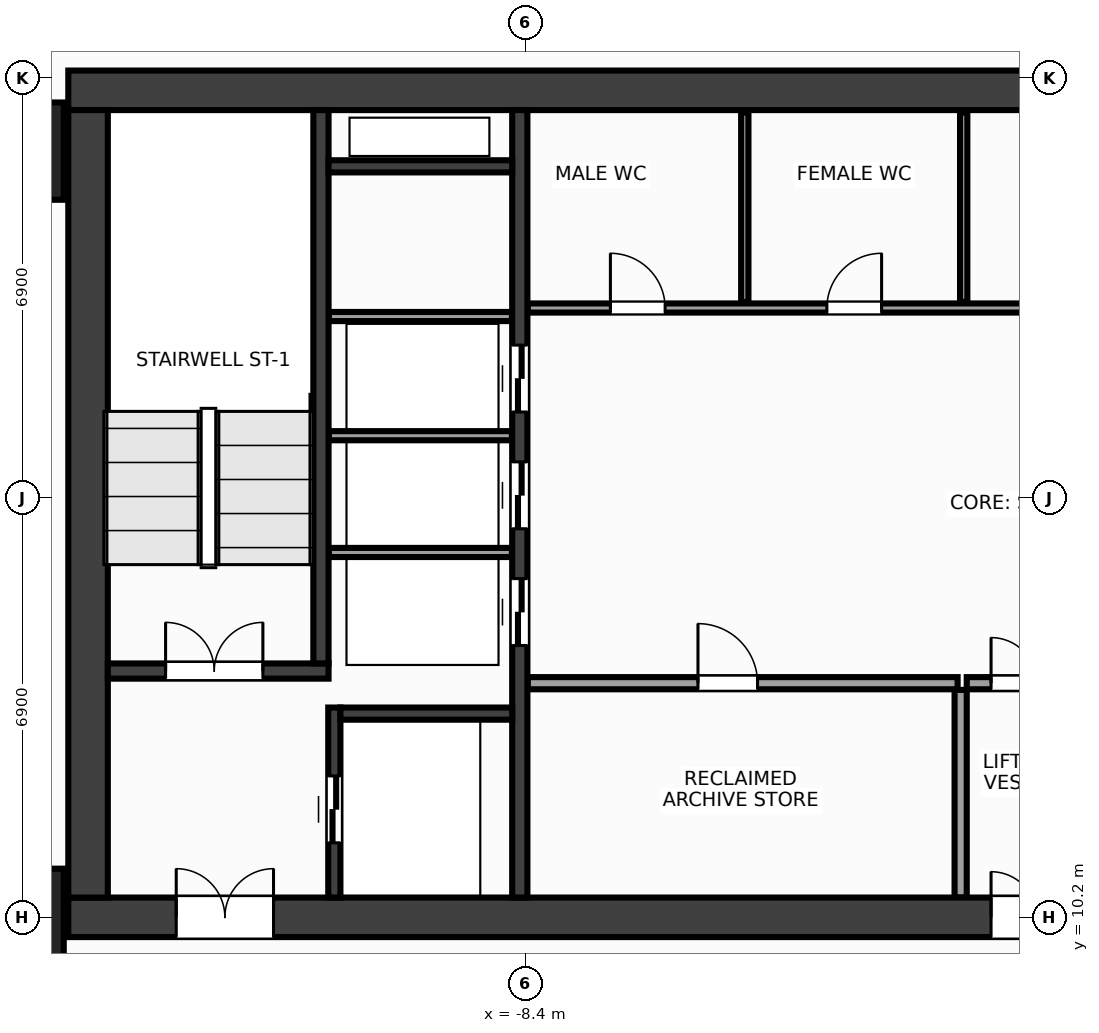
"""IFC4 building model, lengths in metres.
Left out: names, types, materials, properties, quantities, classifications, styles, units other than length and angle.
Written with IfcOpenShell. Run it as: python <this file> out.ifc"""

import sys

from ifc_helpers import new_model, si_unit, direction, frame, frame_2d, origin, origin_2d, place, context, subcontext, project, spatial, rectangle, extrude, source, transform, mapped, element, fill, save


model = new_model("IFC4")
c1 = context("Model", 3, precision=1e-05, world=origin(), true_north=direction((0.0, 1.0)))
c2 = subcontext(c1, "Body", "Model", "MODEL_VIEW")
j1 = project(units=[si_unit("LENGTHUNIT", "METRE"), si_unit("PLANEANGLEUNIT", "RADIAN")], contexts=[c1])
p1 = place(None, origin())
s1 = spatial("IfcSite", under=j1, at=p1, CompositionType="ELEMENT")
p2 = place(p1, origin())
s2 = spatial("IfcBuilding", under=s1, at=p2, CompositionType="ELEMENT")
p3 = place(p2, frame((0.0, 0.0, 146.0)))
s3 = spatial("IfcBuildingStorey", under=s2, at=p3, CompositionType="ELEMENT", Elevation=146.0)
m1 = source(origin(), c2, "Body", "SweptSolid", [
    extrude(rectangle(XDim=31.85, YDim=0.65, at=frame_2d((15.925, 0.0))), origin(), (0.0, 0.0, 1.0), 3.6),
])
p4 = place(p3, frame((-15.925, 23.8, 0.0), z_axis=(0.0, 0.0, 1.0), x_axis=(1.0, 0.0, 0.0)))
e1 = element("IfcWall", 1, at=p4, inside=s3, PredefinedType="SHEAR", context=c2, shape_type="MappedRepresentation", body=[
    mapped(m1, transform((0.0, 0.0, 0.0), x_axis=(1.0, 0.0, 0.0), y_axis=(0.0, 1.0, 0.0), z_axis=(0.0, 0.0, 1.0), scale=1.0)),
])
p5 = place(p3, frame((-15.925, 10.2, 0.0), z_axis=(0.0, 0.0, 1.0), x_axis=(1.0, 0.0, 0.0)))
e2 = element("IfcWall", 2, at=p5, inside=s3, PredefinedType="SHEAR", context=c2, shape_type="MappedRepresentation", body=[
    mapped(m1, transform((0.0, 0.0, 0.0), x_axis=(1.0, 0.0, 0.0), y_axis=(0.0, 1.0, 0.0), z_axis=(0.0, 0.0, 1.0), scale=1.0)),
])
p6 = place(p5, frame((1.775, 0.0, 0.0)))
e3 = element("IfcOpeningElement", 3, at=p6, cuts=e2, PredefinedType="OPENING", context=c2, shape_type="SweptSolid", body=[
    extrude(rectangle(XDim=1.6, YDim=2.15, at=frame_2d((0.8, 1.075))), frame((0.0, 0.337, 0.0), z_axis=(0.0, -1.0, 0.0), x_axis=(1.0, 0.0, 0.0)), (0.0, 0.0, 1.0), 0.674),
])
p7 = place(p5, frame((28.475, 0.0, 0.0)))
e4 = element("IfcOpeningElement", 4, at=p7, cuts=e2, PredefinedType="OPENING", context=c2, shape_type="SweptSolid", body=[
    extrude(rectangle(XDim=1.6, YDim=2.15, at=frame_2d((0.8, 1.075))), frame((0.0, 0.337, 0.0), z_axis=(0.0, -1.0, 0.0), x_axis=(1.0, 0.0, 0.0)), (0.0, 0.0, 1.0), 0.674),
])
p8 = place(p5, frame((15.175, 0.0, 0.0)))
e5 = element("IfcOpeningElement", 5, at=p8, cuts=e2, PredefinedType="OPENING", context=c2, shape_type="SweptSolid", body=[
    extrude(rectangle(XDim=1.5, YDim=2.2, at=frame_2d((0.75, 1.1))), frame((0.0, 0.337, 0.0), z_axis=(0.0, -1.0, 0.0), x_axis=(1.0, 0.0, 0.0)), (0.0, 0.0, 1.0), 0.674),
])
m2 = source(origin(), c2, "Body", "SweptSolid", [
    extrude(rectangle(XDim=12.95, YDim=0.65, at=frame_2d((6.475, 0.0))), origin(), (0.0, 0.0, 1.0), 3.6),
])
p9 = place(p3, frame((-15.6, 10.525, 0.0), z_axis=(0.0, 0.0, 1.0), x_axis=(0.0, 1.0, 0.0)))
e6 = element("IfcWall", 6, at=p9, inside=s3, PredefinedType="SHEAR", context=c2, shape_type="MappedRepresentation", body=[
    mapped(m2, transform((0.0, 0.0, 0.0), x_axis=(1.0, 0.0, 0.0), y_axis=(0.0, 1.0, 0.0), z_axis=(0.0, 0.0, 1.0), scale=1.0)),
])
m3 = source(origin(), c2, "Body", "SweptSolid", [
    extrude(rectangle(XDim=12.95, YDim=0.25, at=frame_2d((6.475, 0.0))), origin(), (0.0, 0.0, 1.0), 3.6),
])
p10 = place(p3, frame((-8.5, 10.525, 0.0), z_axis=(0.0, 0.0, 1.0), x_axis=(0.0, 1.0, 0.0)))
e7 = element("IfcWall", 7, at=p10, inside=s3, PredefinedType="SHEAR", context=c2, shape_type="MappedRepresentation", body=[
    mapped(m3, transform((0.0, 0.0, 0.0), x_axis=(1.0, 0.0, 0.0), y_axis=(0.0, 1.0, 0.0), z_axis=(0.0, 0.0, 1.0), scale=1.0)),
])
p11 = place(p10, frame((4.145, 0.0, 0.0)))
e8 = element("IfcOpeningElement", 8, at=p11, cuts=e7, PredefinedType="OPENING", context=c2, shape_type="SweptSolid", body=[
    extrude(rectangle(XDim=1.1, YDim=2.15, at=frame_2d((0.55, 1.075))), frame((0.0, 0.137, 0.0), z_axis=(0.0, -1.0, 0.0), x_axis=(1.0, 0.0, 0.0)), (0.0, 0.0, 1.0), 0.274),
])
p12 = place(p10, frame((6.065, 0.0, 0.0)))
e9 = element("IfcOpeningElement", 9, at=p12, cuts=e7, PredefinedType="OPENING", context=c2, shape_type="SweptSolid", body=[
    extrude(rectangle(XDim=1.1, YDim=2.15, at=frame_2d((0.55, 1.075))), frame((0.0, 0.137, 0.0), z_axis=(0.0, -1.0, 0.0), x_axis=(1.0, 0.0, 0.0)), (0.0, 0.0, 1.0), 0.274),
])
p13 = place(p10, frame((7.985, 0.0, 0.0)))
e10 = element("IfcOpeningElement", 10, at=p13, cuts=e7, PredefinedType="OPENING", context=c2, shape_type="SweptSolid", body=[
    extrude(rectangle(XDim=1.1, YDim=2.15, at=frame_2d((0.55, 1.075))), frame((0.0, 0.137, 0.0), z_axis=(0.0, -1.0, 0.0), x_axis=(1.0, 0.0, 0.0)), (0.0, 0.0, 1.0), 0.274),
])
m4 = source(origin(), c2, "Body", "SweptSolid", [
    extrude(rectangle(XDim=3.63, YDim=0.25, at=frame_2d((1.815, 0.0))), origin(), (0.0, 0.0, 1.0), 3.6),
])
p14 = place(p3, frame((-15.275, 14.25, 0.0), z_axis=(0.0, 0.0, 1.0), x_axis=(1.0, 0.0, 0.0)))
e11 = element("IfcWall", 11, at=p14, inside=s3, PredefinedType="SHEAR", context=c2, shape_type="MappedRepresentation", body=[
    mapped(m4, transform((0.0, 0.0, 0.0), x_axis=(1.0, 0.0, 0.0), y_axis=(0.0, 1.0, 0.0), z_axis=(0.0, 0.0, 1.0), scale=1.0)),
])
p15 = place(p14, frame((0.95, 0.0, 0.0)))
e12 = element("IfcOpeningElement", 12, at=p15, cuts=e11, PredefinedType="OPENING", context=c2, shape_type="SweptSolid", body=[
    extrude(rectangle(XDim=1.6, YDim=2.15, at=frame_2d((0.8, 1.075))), frame((0.0, 0.137, 0.0), z_axis=(0.0, -1.0, 0.0), x_axis=(1.0, 0.0, 0.0)), (0.0, 0.0, 1.0), 0.274),
])
m5 = source(origin(), c2, "Body", "SweptSolid", [
    extrude(rectangle(XDim=9.1, YDim=0.25, at=frame_2d((4.55, 0.0))), origin(), (0.0, 0.0, 1.0), 3.6),
])
p16 = place(p3, frame((-11.77, 14.375, 0.0), z_axis=(0.0, 0.0, 1.0), x_axis=(0.0, 1.0, 0.0)))
e13 = element("IfcWall", 13, at=p16, inside=s3, PredefinedType="SHEAR", context=c2, shape_type="MappedRepresentation", body=[
    mapped(m5, transform((0.0, 0.0, 0.0), x_axis=(1.0, 0.0, 0.0), y_axis=(0.0, 1.0, 0.0), z_axis=(0.0, 0.0, 1.0), scale=1.0)),
])
m6 = source(origin(), c2, "Body", "SweptSolid", [
    extrude(rectangle(XDim=3.125, YDim=0.2, at=frame_2d((1.562, 0.0))), origin(), (0.0, 0.0, 1.0), 3.6),
])
p17 = place(p3, frame((-11.55, 10.525, 0.0), z_axis=(0.0, 0.0, 1.0), x_axis=(0.0, 1.0, 0.0)))
e14 = element("IfcWall", 14, at=p17, inside=s3, PredefinedType="SHEAR", context=c2, shape_type="MappedRepresentation", body=[
    mapped(m6, transform((0.0, 0.0, 0.0), x_axis=(1.0, 0.0, 0.0), y_axis=(0.0, 1.0, 0.0), z_axis=(0.0, 0.0, 1.0), scale=1.0)),
])
p18 = place(p17, frame((0.9, 0.0, 0.0)))
e15 = element("IfcOpeningElement", 15, at=p18, cuts=e14, PredefinedType="OPENING", context=c2, shape_type="SweptSolid", body=[
    extrude(rectangle(XDim=1.1, YDim=2.15, at=frame_2d((0.55, 1.075))), frame((0.0, 0.112, 0.0), z_axis=(0.0, -1.0, 0.0), x_axis=(1.0, 0.0, 0.0)), (0.0, 0.0, 1.0), 0.224),
])
m7 = source(origin(), c2, "Body", "SweptSolid", [
    extrude(rectangle(XDim=2.825, YDim=0.2, at=frame_2d((1.413, 0.0))), origin(), (0.0, 0.0, 1.0), 3.6),
])
p19 = place(p3, frame((-11.45, 13.55, 0.0), z_axis=(0.0, 0.0, 1.0), x_axis=(1.0, 0.0, 0.0)))
e16 = element("IfcWall", 16, at=p19, inside=s3, PredefinedType="SHEAR", context=c2, shape_type="MappedRepresentation", body=[
    mapped(m7, transform((0.0, 0.0, 0.0), x_axis=(1.0, 0.0, 0.0), y_axis=(0.0, 1.0, 0.0), z_axis=(0.0, 0.0, 1.0), scale=1.0)),
])
m8 = source(origin(), c2, "Body", "SweptSolid", [
    extrude(rectangle(XDim=3.02, YDim=0.2, at=frame_2d((1.51, 0.0))), origin(), (0.0, 0.0, 1.0), 3.6),
])
p20 = place(p3, frame((-11.645, 22.55, 0.0), z_axis=(0.0, 0.0, 1.0), x_axis=(1.0, 0.0, 0.0)))
e17 = element("IfcWall", 17, at=p20, inside=s3, PredefinedType="SHEAR", context=c2, shape_type="MappedRepresentation", body=[
    mapped(m8, transform((0.0, 0.0, 0.0), x_axis=(1.0, 0.0, 0.0), y_axis=(0.0, 1.0, 0.0), z_axis=(0.0, 0.0, 1.0), scale=1.0)),
])
m9 = source(origin(), c2, "Body", "SweptSolid", [
    extrude(rectangle(XDim=1.6, YDim=1.6, at=origin_2d()), origin(), (0.0, 0.0, 1.0), 3.6),
])
for number, where, z_axis, x_axis in (
    (18, (-16.8, 10.2, 0.0), (0.0, 0.0, 1.0), (1.0, 0.0, 0.0)),
    (19, (-16.8, 22.8, 0.0), (0.0, 0.0, 1.0), (1.0, 0.0, 0.0)),
):
    element("IfcColumn", number, at=place(p3, frame(where, z_axis=z_axis, x_axis=x_axis)), inside=s3, PredefinedType="COLUMN", context=c2, shape_type="MappedRepresentation", body=[
        mapped(m9, transform((0.0, 0.0, 0.0), x_axis=(1.0, 0.0, 0.0), y_axis=(0.0, 1.0, 0.0), z_axis=(0.0, 0.0, 1.0), scale=1.0)),
    ])
m10 = source(origin(), c2, "Body", "SweptSolid", [
    extrude(rectangle(XDim=3.01, YDim=0.15, at=frame_2d((1.505, 0.0))), origin(), (0.0, 0.0, 1.0), 3.38),
])
for number, where, z_axis, x_axis in (
    (20, (-11.64, 16.2, 0.0), (0.0, 0.0, 1.0), (1.0, 0.0, 0.0)),
    (21, (-11.64, 18.12, 0.0), (0.0, 0.0, 1.0), (1.0, 0.0, 0.0)),
    (22, (-11.64, 20.08, 0.0), (0.0, 0.0, 1.0), (1.0, 0.0, 0.0)),
):
    element("IfcWall", number, at=place(p3, frame(where, z_axis=z_axis, x_axis=x_axis)), inside=s3, PredefinedType="PARTITIONING", context=c2, shape_type="MappedRepresentation", body=[
        mapped(m10, transform((0.0, 0.0, 0.0), x_axis=(1.0, 0.0, 0.0), y_axis=(0.0, 1.0, 0.0), z_axis=(0.0, 0.0, 1.0), scale=1.0)),
    ])
m11 = source(origin(), c2, "Body", "SweptSolid", [
    extrude(rectangle(XDim=7.07, YDim=0.2, at=frame_2d((3.535, 0.0))), origin(), (0.0, 0.0, 1.0), 3.38),
])
p21 = place(p3, frame((-8.37, 14.05, 0.0), z_axis=(0.0, 0.0, 1.0), x_axis=(1.0, 0.0, 0.0)))
e23 = element("IfcWall", 23, at=p21, inside=s3, PredefinedType="PARTITIONING", context=c2, shape_type="MappedRepresentation", body=[
    mapped(m11, transform((0.0, 0.0, 0.0), x_axis=(1.0, 0.0, 0.0), y_axis=(0.0, 1.0, 0.0), z_axis=(0.0, 0.0, 1.0), scale=1.0)),
])
p22 = place(p21, frame((2.8, 0.0, 0.0)))
e24 = element("IfcOpeningElement", 24, at=p22, cuts=e23, PredefinedType="OPENING", context=c2, shape_type="SweptSolid", body=[
    extrude(rectangle(XDim=0.98, YDim=2.15, at=frame_2d((0.49, 1.075))), frame((0.0, 0.112, 0.0), z_axis=(0.0, -1.0, 0.0), x_axis=(1.0, 0.0, 0.0)), (0.0, 0.0, 1.0), 0.224),
])
m12 = source(origin(), c2, "Body", "SweptSolid", [
    extrude(rectangle(XDim=3.415, YDim=0.2, at=frame_2d((1.708, 0.0))), origin(), (0.0, 0.0, 1.0), 3.38),
])
p23 = place(p3, frame((-1.25, 10.525, 0.0), z_axis=(0.0, 0.0, 1.0), x_axis=(0.0, 1.0, 0.0)))
e25 = element("IfcWall", 25, at=p23, inside=s3, PredefinedType="PARTITIONING", context=c2, shape_type="MappedRepresentation", body=[
    mapped(m12, transform((0.0, 0.0, 0.0), x_axis=(1.0, 0.0, 0.0), y_axis=(0.0, 1.0, 0.0), z_axis=(0.0, 0.0, 1.0), scale=1.0)),
])
m13 = source(origin(), c2, "Body", "SweptSolid", [
    extrude(rectangle(XDim=2.3, YDim=0.2, at=frame_2d((1.15, 0.0))), origin(), (0.0, 0.0, 1.0), 3.38),
])
p24 = place(p3, frame((-1.15, 14.05, 0.0), z_axis=(0.0, 0.0, 1.0), x_axis=(1.0, 0.0, 0.0)))
e26 = element("IfcWall", 26, at=p24, inside=s3, PredefinedType="PARTITIONING", context=c2, shape_type="MappedRepresentation", body=[
    mapped(m13, transform((0.0, 0.0, 0.0), x_axis=(1.0, 0.0, 0.0), y_axis=(0.0, 1.0, 0.0), z_axis=(0.0, 0.0, 1.0), scale=1.0)),
])
p25 = place(p24, frame((0.4, 0.0, 0.0)))
e27 = element("IfcOpeningElement", 27, at=p25, cuts=e26, PredefinedType="OPENING", context=c2, shape_type="SweptSolid", body=[
    extrude(rectangle(XDim=1.5, YDim=2.2, at=frame_2d((0.75, 1.1))), frame((0.0, 0.112, 0.0), z_axis=(0.0, -1.0, 0.0), x_axis=(1.0, 0.0, 0.0)), (0.0, 0.0, 1.0), 0.224),
])
m14 = source(origin(), c2, "Body", "SweptSolid", [
    extrude(rectangle(XDim=14.59, YDim=0.15, at=frame_2d((7.295, 0.0))), origin(), (0.0, 0.0, 1.0), 3.38),
])
p26 = place(p3, frame((-8.37, 20.22, 0.0), z_axis=(0.0, 0.0, 1.0), x_axis=(1.0, 0.0, 0.0)))
e28 = element("IfcWall", 28, at=p26, inside=s3, PredefinedType="PARTITIONING", context=c2, shape_type="MappedRepresentation", body=[
    mapped(m14, transform((0.0, 0.0, 0.0), x_axis=(1.0, 0.0, 0.0), y_axis=(0.0, 1.0, 0.0), z_axis=(0.0, 0.0, 1.0), scale=1.0)),
])
p27 = place(p26, frame((1.36, 0.0, 0.0)))
e29 = element("IfcOpeningElement", 29, at=p27, cuts=e28, PredefinedType="OPENING", context=c2, shape_type="SweptSolid", body=[
    extrude(rectangle(XDim=0.9, YDim=2.15, at=frame_2d((0.45, 1.075))), frame((0.0, 0.087, 0.0), z_axis=(0.0, -1.0, 0.0), x_axis=(1.0, 0.0, 0.0)), (0.0, 0.0, 1.0), 0.174),
])
p28 = place(p26, frame((4.92, 0.0, 0.0)))
e30 = element("IfcOpeningElement", 30, at=p28, cuts=e28, PredefinedType="OPENING", context=c2, shape_type="SweptSolid", body=[
    extrude(rectangle(XDim=0.9, YDim=2.15, at=frame_2d((0.45, 1.075))), frame((0.0, 0.087, 0.0), z_axis=(0.0, -1.0, 0.0), x_axis=(1.0, 0.0, 0.0)), (0.0, 0.0, 1.0), 0.174),
])
p29 = place(p26, frame((10.37, 0.0, 0.0)))
e31 = element("IfcOpeningElement", 31, at=p29, cuts=e28, PredefinedType="OPENING", context=c2, shape_type="SweptSolid", body=[
    extrude(rectangle(XDim=0.9, YDim=2.15, at=frame_2d((0.45, 1.075))), frame((0.0, 0.087, 0.0), z_axis=(0.0, -1.0, 0.0), x_axis=(1.0, 0.0, 0.0)), (0.0, 0.0, 1.0), 0.174),
])
m15 = source(origin(), c2, "Body", "SweptSolid", [
    extrude(rectangle(XDim=3.115, YDim=0.12, at=frame_2d((1.558, 0.0))), origin(), (0.0, 0.0, 1.0), 3.38),
])
for number, where, z_axis, x_axis in (
    (32, (-4.8, 20.32, 0.0), (0.0, 0.0, 1.0), (0.0, 1.0, 0.0)),
    (33, (-1.2, 20.32, 0.0), (0.0, 0.0, 1.0), (0.0, 1.0, 0.0)),
):
    element("IfcWall", number, at=place(p3, frame(where, z_axis=z_axis, x_axis=x_axis)), inside=s3, PredefinedType="PARTITIONING", context=c2, shape_type="MappedRepresentation", body=[
        mapped(m15, transform((0.0, 0.0, 0.0), x_axis=(1.0, 0.0, 0.0), y_axis=(0.0, 1.0, 0.0), z_axis=(0.0, 0.0, 1.0), scale=1.0)),
    ])
m16 = source(origin(), c2, "Body", "SweptSolid", [
    extrude(rectangle(XDim=1.6, YDim=2.15, at=frame_2d((0.8, 1.075))), frame((0.0, 0.025, 0.0), z_axis=(0.0, -1.0, 0.0), x_axis=(1.0, 0.0, 0.0)), (0.0, 0.0, 1.0), 0.05),
])
p30 = place(p15, origin())
e34 = element("IfcDoor", 34, at=p30, inside=s3, OperationType="DOUBLE_DOOR_SINGLE_SWING", PredefinedType="DOOR", context=c2, shape_type="MappedRepresentation", body=[
    mapped(m16, transform((0.0, 0.0, 0.0), x_axis=(1.0, 0.0, 0.0), y_axis=(0.0, 1.0, 0.0), z_axis=(0.0, 0.0, 1.0), scale=1.0)),
])
fill(e12, e34)
p31 = place(p6, origin())
e35 = element("IfcDoor", 35, at=p31, inside=s3, OperationType="DOUBLE_DOOR_SINGLE_SWING", PredefinedType="DOOR", context=c2, shape_type="MappedRepresentation", body=[
    mapped(m16, transform((0.0, 0.0, 0.0), x_axis=(1.0, 0.0, 0.0), y_axis=(0.0, 1.0, 0.0), z_axis=(0.0, 0.0, 1.0), scale=1.0)),
])
fill(e3, e35)
m17 = source(origin(), c2, "Body", "SweptSolid", [
    extrude(rectangle(XDim=1.1, YDim=2.15, at=frame_2d((0.55, 1.075))), frame((0.0, 0.025, 0.0), z_axis=(0.0, -1.0, 0.0), x_axis=(1.0, 0.0, 0.0)), (0.0, 0.0, 1.0), 0.05),
])
p32 = place(p18, origin())
e36 = element("IfcDoor", 36, at=p32, inside=s3, OperationType="DOUBLE_DOOR_SLIDING", PredefinedType="DOOR", context=c2, shape_type="MappedRepresentation", body=[
    mapped(m17, transform((0.0, 0.0, 0.0), x_axis=(1.0, 0.0, 0.0), y_axis=(0.0, 1.0, 0.0), z_axis=(0.0, 0.0, 1.0), scale=1.0)),
])
fill(e15, e36)
p33 = place(p11, origin())
e37 = element("IfcDoor", 37, at=p33, inside=s3, OperationType="DOUBLE_DOOR_SLIDING", PredefinedType="DOOR", context=c2, shape_type="MappedRepresentation", body=[
    mapped(m17, transform((0.0, 0.0, 0.0), x_axis=(1.0, 0.0, 0.0), y_axis=(0.0, 1.0, 0.0), z_axis=(0.0, 0.0, 1.0), scale=1.0)),
])
fill(e8, e37)
p34 = place(p12, origin())
e38 = element("IfcDoor", 38, at=p34, inside=s3, OperationType="DOUBLE_DOOR_SLIDING", PredefinedType="DOOR", context=c2, shape_type="MappedRepresentation", body=[
    mapped(m17, transform((0.0, 0.0, 0.0), x_axis=(1.0, 0.0, 0.0), y_axis=(0.0, 1.0, 0.0), z_axis=(0.0, 0.0, 1.0), scale=1.0)),
])
fill(e9, e38)
p35 = place(p13, origin())
e39 = element("IfcDoor", 39, at=p35, inside=s3, OperationType="DOUBLE_DOOR_SLIDING", PredefinedType="DOOR", context=c2, shape_type="MappedRepresentation", body=[
    mapped(m17, transform((0.0, 0.0, 0.0), x_axis=(1.0, 0.0, 0.0), y_axis=(0.0, 1.0, 0.0), z_axis=(0.0, 0.0, 1.0), scale=1.0)),
])
fill(e10, e39)
m18 = source(origin(), c2, "Body", "SweptSolid", [
    extrude(rectangle(XDim=0.98, YDim=2.15, at=frame_2d((0.49, 1.075))), frame((0.0, 0.025, 0.0), z_axis=(0.0, -1.0, 0.0), x_axis=(1.0, 0.0, 0.0)), (0.0, 0.0, 1.0), 0.05),
])
p36 = place(p22, origin())
e40 = element("IfcDoor", 40, at=p36, inside=s3, OperationType="SINGLE_SWING_LEFT", PredefinedType="DOOR", context=c2, shape_type="MappedRepresentation", body=[
    mapped(m18, transform((0.0, 0.0, 0.0), x_axis=(1.0, 0.0, 0.0), y_axis=(0.0, 1.0, 0.0), z_axis=(0.0, 0.0, 1.0), scale=1.0)),
])
fill(e24, e40)
m19 = source(origin(), c2, "Body", "SweptSolid", [
    extrude(rectangle(XDim=1.5, YDim=2.2, at=frame_2d((0.75, 1.1))), frame((0.0, 0.025, 0.0), z_axis=(0.0, -1.0, 0.0), x_axis=(1.0, 0.0, 0.0)), (0.0, 0.0, 1.0), 0.05),
])
p37 = place(p25, origin())
e41 = element("IfcDoor", 41, at=p37, inside=s3, OperationType="DOUBLE_DOOR_SINGLE_SWING", PredefinedType="DOOR", context=c2, shape_type="MappedRepresentation", body=[
    mapped(m19, transform((0.0, 0.0, 0.0), x_axis=(1.0, 0.0, 0.0), y_axis=(0.0, 1.0, 0.0), z_axis=(0.0, 0.0, 1.0), scale=1.0)),
])
fill(e27, e41)
p38 = place(p8, origin())
e42 = element("IfcDoor", 42, at=p38, inside=s3, OperationType="DOUBLE_DOOR_SINGLE_SWING", PredefinedType="DOOR", context=c2, shape_type="MappedRepresentation", body=[
    mapped(m19, transform((0.0, 0.0, 0.0), x_axis=(1.0, 0.0, 0.0), y_axis=(0.0, 1.0, 0.0), z_axis=(0.0, 0.0, 1.0), scale=1.0)),
])
fill(e5, e42)
m20 = source(origin(), c2, "Body", "SweptSolid", [
    extrude(rectangle(XDim=0.9, YDim=2.15, at=frame_2d((0.45, 1.075))), frame((0.0, 0.025, 0.0), z_axis=(0.0, -1.0, 0.0), x_axis=(1.0, 0.0, 0.0)), (0.0, 0.0, 1.0), 0.05),
])
p39 = place(p27, origin())
e43 = element("IfcDoor", 43, at=p39, inside=s3, OperationType="SINGLE_SWING_LEFT", PredefinedType="DOOR", context=c2, shape_type="MappedRepresentation", body=[
    mapped(m20, transform((0.0, 0.0, 0.0), x_axis=(1.0, 0.0, 0.0), y_axis=(0.0, 1.0, 0.0), z_axis=(0.0, 0.0, 1.0), scale=1.0)),
])
fill(e29, e43)
p40 = place(p28, origin())
e44 = element("IfcDoor", 44, at=p40, inside=s3, OperationType="SINGLE_SWING_RIGHT", PredefinedType="DOOR", context=c2, shape_type="MappedRepresentation", body=[
    mapped(m20, transform((0.0, 0.0, 0.0), x_axis=(1.0, 0.0, 0.0), y_axis=(0.0, 1.0, 0.0), z_axis=(0.0, 0.0, 1.0), scale=1.0)),
])
fill(e30, e44)
save(model, sys.argv[1])
